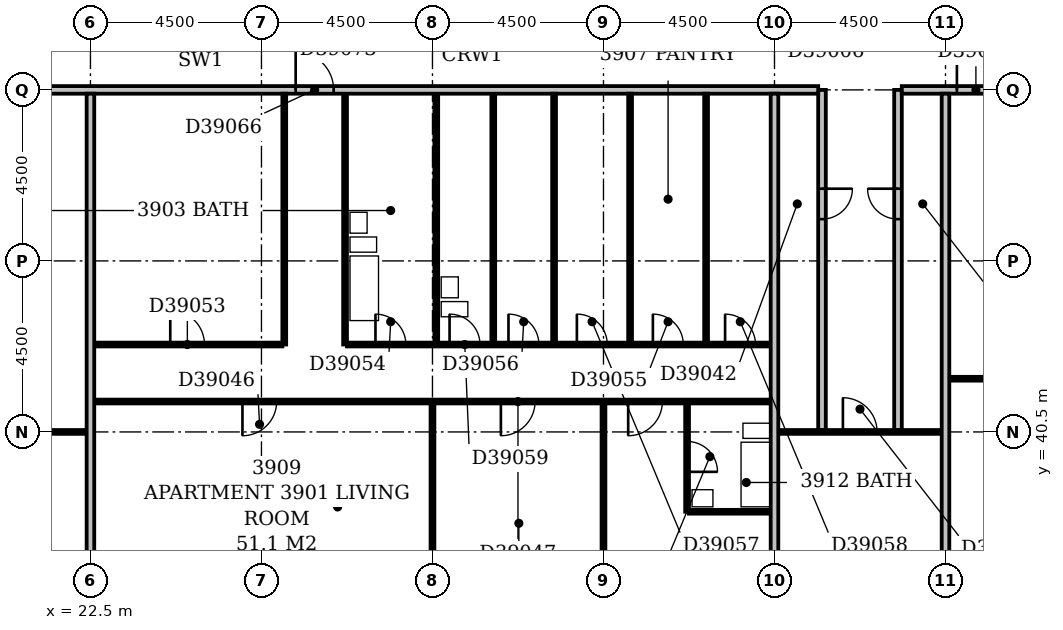
"""IFC4 building model, lengths in metres.
Left out: names, types, materials, properties, quantities, classifications, styles, units other than length and angle.
Written with IfcOpenShell. Run it as: python <this file> out.ifc"""

import sys

from ifc_helpers import new_model, si_unit, direction, frame, frame_2d, origin, place, context, subcontext, project, spatial, rectangle, extrude, element, fill, save


model = new_model("IFC4")
c1 = context("Model", 3, precision=1e-05, world=origin(), true_north=direction((0.0, 1.0)))
c2 = subcontext(c1, "Body", "Model", "MODEL_VIEW")
j1 = project(units=[si_unit("LENGTHUNIT", "METRE"), si_unit("PLANEANGLEUNIT", "RADIAN")], contexts=[c1])
p1 = place(None, origin())
s1 = spatial("IfcSite", under=j1, at=p1, CompositionType="ELEMENT")
p2 = place(p1, origin())
s2 = spatial("IfcBuilding", under=s1, at=p2, CompositionType="ELEMENT")
p3 = place(p2, frame((0.0, 0.0, 155.6)))
s3 = spatial("IfcBuildingStorey", under=s2, at=p3, CompositionType="ELEMENT", Elevation=155.6)
p4 = place(p3, frame((22.5, 36.5, 0.0), z_axis=(0.0, 0.0, 1.0), x_axis=(0.0, 1.0, 0.0)))
e1 = element("IfcWall", 1, at=p4, inside=s3, PredefinedType="PARTITIONING", context=c2, shape_type="SweptSolid", body=[
    extrude(rectangle(XDim=12.9, YDim=0.2, at=frame_2d((6.45, 0.0))), origin(), (0.0, 0.0, 1.0), 3.3),
])
p5 = place(p3, frame((31.5, 36.5, 0.0), z_axis=(0.0, 0.0, 1.0), x_axis=(0.0, 1.0, 0.0)))
e2 = element("IfcWall", 2, at=p5, inside=s3, PredefinedType="PARTITIONING", context=c2, shape_type="SweptSolid", body=[
    extrude(rectangle(XDim=4.75, YDim=0.1, at=frame_2d((2.375, 0.0))), origin(), (0.0, 0.0, 1.0), 3.3),
])
p6 = place(p3, frame((36.0, 36.5, 0.0), z_axis=(0.0, 0.0, 1.0), x_axis=(0.0, 1.0, 0.0)))
e3 = element("IfcWall", 3, at=p6, inside=s3, PredefinedType="PARTITIONING", context=c2, shape_type="SweptSolid", body=[
    extrude(rectangle(XDim=4.75, YDim=0.1, at=frame_2d((2.375, 0.0))), origin(), (0.0, 0.0, 1.0), 2.4),
])
p7 = place(p3, frame((40.5, 36.5, 0.0), z_axis=(0.0, 0.0, 1.0), x_axis=(0.0, 1.0, 0.0)))
e4 = element("IfcWall", 4, at=p7, inside=s3, PredefinedType="PARTITIONING", context=c2, shape_type="SweptSolid", body=[
    extrude(rectangle(XDim=12.9, YDim=0.2, at=frame_2d((6.45, 0.0))), origin(), (0.0, 0.0, 1.0), 3.3),
])
p8 = place(p3, frame((45.0, 36.5, 0.0), z_axis=(0.0, 0.0, 1.0), x_axis=(0.0, 1.0, 0.0)))
e5 = element("IfcWall", 5, at=p8, inside=s3, PredefinedType="PARTITIONING", context=c2, shape_type="SweptSolid", body=[
    extrude(rectangle(XDim=12.9, YDim=0.2, at=frame_2d((6.45, 0.0))), origin(), (0.0, 0.0, 1.0), 2.6),
])
p9 = place(p3, frame((38.2, 38.4, 0.0), z_axis=(0.0, 0.0, 1.0), x_axis=(0.0, 1.0, 0.0)))
e6 = element("IfcWall", 6, at=p9, inside=s3, PredefinedType="PLUMBINGWALL", context=c2, shape_type="SweptSolid", body=[
    extrude(rectangle(XDim=2.85, YDim=0.1, at=frame_2d((1.425, 0.0))), origin(), (0.0, 0.0, 1.0), 3.3),
])
p10 = place(p9, frame((1.05, 0.0, 0.0)))
e7 = element("IfcOpeningElement", 7, at=p10, cuts=e6, PredefinedType="OPENING", context=c2, shape_type="SweptSolid", body=[
    extrude(rectangle(XDim=0.8, YDim=2.1, at=frame_2d((0.4, 1.05))), frame((0.0, 0.062, 0.0), z_axis=(0.0, -1.0, 0.0), x_axis=(1.0, 0.0, 0.0)), (0.0, 0.0, 1.0), 0.124),
])
p11 = place(p3, frame((38.25, 38.4, 0.0), z_axis=(0.0, 0.0, 1.0), x_axis=(1.0, 0.0, 0.0)))
e8 = element("IfcWall", 8, at=p11, inside=s3, PredefinedType="PLUMBINGWALL", context=c2, shape_type="SweptSolid", body=[
    extrude(rectangle(XDim=2.15, YDim=0.1, at=frame_2d((1.075, 0.0))), origin(), (0.0, 0.0, 1.0), 3.3),
])
p12 = place(p3, frame((9.1, 40.5, 0.0), z_axis=(0.0, 0.0, 1.0), x_axis=(1.0, 0.0, 0.0)))
e9 = element("IfcWall", 9, at=p12, inside=s3, PredefinedType="PARTITIONING", context=c2, shape_type="SweptSolid", body=[
    extrude(rectangle(XDim=13.3, YDim=0.1, at=frame_2d((6.65, 0.0))), origin(), (0.0, 0.0, 1.0), 3.3),
])
p13 = place(p3, frame((40.6, 40.5, 0.0), z_axis=(0.0, 0.0, 1.0), x_axis=(1.0, 0.0, 0.0)))
e10 = element("IfcWall", 10, at=p13, inside=s3, PredefinedType="PARTITIONING", context=c2, shape_type="SweptSolid", body=[
    extrude(rectangle(XDim=4.3, YDim=0.1, at=frame_2d((2.15, 0.0))), origin(), (0.0, 0.0, 1.0), 3.3),
])
p14 = place(p13, frame((1.7, 0.0, 0.0)))
e11 = element("IfcOpeningElement", 11, at=p14, cuts=e10, PredefinedType="OPENING", context=c2, shape_type="SweptSolid", body=[
    extrude(rectangle(XDim=0.9, YDim=2.1, at=frame_2d((0.45, 1.05))), frame((0.0, 0.062, 0.0), z_axis=(0.0, -1.0, 0.0), x_axis=(1.0, 0.0, 0.0)), (0.0, 0.0, 1.0), 0.124),
])
p15 = place(p3, frame((41.75, 40.55, 0.0), z_axis=(0.0, 0.0, 1.0), x_axis=(0.0, 1.0, 0.0)))
e12 = element("IfcWall", 12, at=p15, inside=s3, PredefinedType="PARTITIONING", context=c2, shape_type="SweptSolid", body=[
    extrude(rectangle(XDim=8.95, YDim=0.2, at=frame_2d((4.475, 0.0))), origin(), (0.0, 0.0, 1.0), 3.3),
])
p16 = place(p15, frame((5.55, 0.0, 0.0)))
e13 = element("IfcOpeningElement", 13, at=p16, cuts=e12, PredefinedType="OPENING", context=c2, shape_type="SweptSolid", body=[
    extrude(rectangle(XDim=0.8, YDim=2.1, at=frame_2d((0.4, 1.05))), frame((0.0, 0.112, 0.0), z_axis=(0.0, -1.0, 0.0), x_axis=(1.0, 0.0, 0.0)), (0.0, 0.0, 1.0), 0.224),
])
p17 = place(p3, frame((43.75, 40.55, 0.0), z_axis=(0.0, 0.0, 1.0), x_axis=(0.0, 1.0, 0.0)))
e14 = element("IfcWall", 14, at=p17, inside=s3, PredefinedType="PARTITIONING", context=c2, shape_type="SweptSolid", body=[
    extrude(rectangle(XDim=8.95, YDim=0.2, at=frame_2d((4.475, 0.0))), origin(), (0.0, 0.0, 1.0), 3.3),
])
p18 = place(p17, frame((5.55, 0.0, 0.0)))
e15 = element("IfcOpeningElement", 15, at=p18, cuts=e14, PredefinedType="OPENING", context=c2, shape_type="SweptSolid", body=[
    extrude(rectangle(XDim=0.8, YDim=2.1, at=frame_2d((0.4, 1.05))), frame((0.0, 0.112, 0.0), z_axis=(0.0, -1.0, 0.0), x_axis=(1.0, 0.0, 0.0)), (0.0, 0.0, 1.0), 0.224),
])
p19 = place(p3, frame((22.6, 41.3, 0.0), z_axis=(0.0, 0.0, 1.0), x_axis=(1.0, 0.0, 0.0)))
e16 = element("IfcWall", 16, at=p19, inside=s3, PredefinedType="PARTITIONING", context=c2, shape_type="SweptSolid", body=[
    extrude(rectangle(XDim=17.8, YDim=0.1, at=frame_2d((8.9, 0.0))), origin(), (0.0, 0.0, 1.0), 3.3),
])
p20 = place(p19, frame((3.9, 0.0, 0.0)))
e17 = element("IfcOpeningElement", 17, at=p20, cuts=e16, PredefinedType="OPENING", context=c2, shape_type="SweptSolid", body=[
    extrude(rectangle(XDim=0.9, YDim=2.1, at=frame_2d((0.45, 1.05))), frame((0.0, 0.062, 0.0), z_axis=(0.0, -1.0, 0.0), x_axis=(1.0, 0.0, 0.0)), (0.0, 0.0, 1.0), 0.124),
])
p21 = place(p19, frame((10.7, 0.0, 0.0)))
e18 = element("IfcOpeningElement", 18, at=p21, cuts=e16, PredefinedType="OPENING", context=c2, shape_type="SweptSolid", body=[
    extrude(rectangle(XDim=0.9, YDim=2.1, at=frame_2d((0.45, 1.05))), frame((0.0, 0.062, 0.0), z_axis=(0.0, -1.0, 0.0), x_axis=(1.0, 0.0, 0.0)), (0.0, 0.0, 1.0), 0.124),
])
p22 = place(p19, frame((14.05, 0.0, 0.0)))
e19 = element("IfcOpeningElement", 19, at=p22, cuts=e16, PredefinedType="OPENING", context=c2, shape_type="SweptSolid", body=[
    extrude(rectangle(XDim=0.9, YDim=2.1, at=frame_2d((0.45, 1.05))), frame((0.0, 0.062, 0.0), z_axis=(0.0, -1.0, 0.0), x_axis=(1.0, 0.0, 0.0)), (0.0, 0.0, 1.0), 0.124),
])
p23 = place(p3, frame((45.1, 41.9, 0.0), z_axis=(0.0, 0.0, 1.0), x_axis=(1.0, 0.0, 0.0)))
e20 = element("IfcWall", 20, at=p23, inside=s3, PredefinedType="PARTITIONING", context=c2, shape_type="SweptSolid", body=[
    extrude(rectangle(XDim=13.3, YDim=0.1, at=frame_2d((6.65, 0.0))), origin(), (0.0, 0.0, 1.0), 3.3),
])
p24 = place(p23, frame((1.7, 0.0, 0.0)))
e21 = element("IfcOpeningElement", 21, at=p24, cuts=e20, PredefinedType="OPENING", context=c2, shape_type="SweptSolid", body=[
    extrude(rectangle(XDim=0.9, YDim=2.1, at=frame_2d((0.45, 1.05))), frame((0.0, 0.062, 0.0), z_axis=(0.0, -1.0, 0.0), x_axis=(1.0, 0.0, 0.0)), (0.0, 0.0, 1.0), 0.124),
])
p25 = place(p23, frame((6.2, 0.0, 0.0)))
e22 = element("IfcOpeningElement", 22, at=p25, cuts=e20, PredefinedType="OPENING", context=c2, shape_type="SweptSolid", body=[
    extrude(rectangle(XDim=0.9, YDim=2.1, at=frame_2d((0.45, 1.05))), frame((0.0, 0.062, 0.0), z_axis=(0.0, -1.0, 0.0), x_axis=(1.0, 0.0, 0.0)), (0.0, 0.0, 1.0), 0.124),
])
p26 = place(p23, frame((10.7, 0.0, 0.0)))
e23 = element("IfcOpeningElement", 23, at=p26, cuts=e20, PredefinedType="OPENING", context=c2, shape_type="SweptSolid", body=[
    extrude(rectangle(XDim=0.9, YDim=2.1, at=frame_2d((0.45, 1.05))), frame((0.0, 0.062, 0.0), z_axis=(0.0, -1.0, 0.0), x_axis=(1.0, 0.0, 0.0)), (0.0, 0.0, 1.0), 0.124),
])
p27 = place(p3, frame((22.6, 42.8, 0.0), z_axis=(0.0, 0.0, 1.0), x_axis=(1.0, 0.0, 0.0)))
e24 = element("IfcWall", 24, at=p27, inside=s3, PredefinedType="PARTITIONING", context=c2, shape_type="SweptSolid", body=[
    extrude(rectangle(XDim=4.95, YDim=0.1, at=frame_2d((2.475, 0.0))), origin(), (0.0, 0.0, 1.0), 3.3),
])
p28 = place(p27, frame((2.0, 0.0, 0.0)))
e25 = element("IfcOpeningElement", 25, at=p28, cuts=e24, PredefinedType="OPENING", context=c2, shape_type="SweptSolid", body=[
    extrude(rectangle(XDim=0.9, YDim=2.1, at=frame_2d((0.45, 1.05))), frame((0.0, 0.062, 0.0), z_axis=(0.0, -1.0, 0.0), x_axis=(1.0, 0.0, 0.0)), (0.0, 0.0, 1.0), 0.124),
])
p29 = place(p3, frame((27.6, 42.8, 0.0), z_axis=(0.0, 0.0, 1.0), x_axis=(0.0, 1.0, 0.0)))
e26 = element("IfcWall", 26, at=p29, inside=s3, PredefinedType="PARTITIONING", context=c2, shape_type="SweptSolid", body=[
    extrude(rectangle(XDim=6.6, YDim=0.1, at=frame_2d((3.3, 0.0))), origin(), (0.0, 0.0, 1.0), 2.6),
])
p30 = place(p3, frame((29.2, 42.8, 0.0), z_axis=(0.0, 0.0, 1.0), x_axis=(0.0, 1.0, 0.0)))
e27 = element("IfcWall", 27, at=p30, inside=s3, PredefinedType="PLUMBINGWALL", context=c2, shape_type="SweptSolid", body=[
    extrude(rectangle(XDim=6.6, YDim=0.1, at=frame_2d((3.3, 0.0))), origin(), (0.0, 0.0, 1.0), 3.3),
])
p31 = place(p3, frame((29.25, 42.8, 0.0), z_axis=(0.0, 0.0, 1.0), x_axis=(1.0, 0.0, 0.0)))
e28 = element("IfcWall", 28, at=p31, inside=s3, PredefinedType="PARTITIONING", context=c2, shape_type="SweptSolid", body=[
    extrude(rectangle(XDim=11.15, YDim=0.1, at=frame_2d((5.575, 0.0))), origin(), (0.0, 0.0, 1.0), 3.3),
])
p32 = place(p31, frame((0.75, 0.0, 0.0)))
e29 = element("IfcOpeningElement", 29, at=p32, cuts=e28, PredefinedType="OPENING", context=c2, shape_type="SweptSolid", body=[
    extrude(rectangle(XDim=0.8, YDim=2.1, at=frame_2d((0.4, 1.05))), frame((0.0, 0.062, 0.0), z_axis=(0.0, -1.0, 0.0), x_axis=(1.0, 0.0, 0.0)), (0.0, 0.0, 1.0), 0.124),
])
p33 = place(p31, frame((8.05, 0.0, 0.0)))
e30 = element("IfcOpeningElement", 30, at=p33, cuts=e28, PredefinedType="OPENING", context=c2, shape_type="SweptSolid", body=[
    extrude(rectangle(XDim=0.8, YDim=2.1, at=frame_2d((0.4, 1.05))), frame((0.0, 0.062, 0.0), z_axis=(0.0, -1.0, 0.0), x_axis=(1.0, 0.0, 0.0)), (0.0, 0.0, 1.0), 0.124),
])
p34 = place(p31, frame((4.25, 0.0, 0.0)))
e31 = element("IfcOpeningElement", 31, at=p34, cuts=e28, PredefinedType="OPENING", context=c2, shape_type="SweptSolid", body=[
    extrude(rectangle(XDim=0.8, YDim=2.1, at=frame_2d((0.4, 1.05))), frame((0.0, 0.062, 0.0), z_axis=(0.0, -1.0, 0.0), x_axis=(1.0, 0.0, 0.0)), (0.0, 0.0, 1.0), 0.124),
])
p35 = place(p31, frame((6.05, 0.0, 0.0)))
e32 = element("IfcOpeningElement", 32, at=p35, cuts=e28, PredefinedType="OPENING", context=c2, shape_type="SweptSolid", body=[
    extrude(rectangle(XDim=0.8, YDim=2.1, at=frame_2d((0.4, 1.05))), frame((0.0, 0.062, 0.0), z_axis=(0.0, -1.0, 0.0), x_axis=(1.0, 0.0, 0.0)), (0.0, 0.0, 1.0), 0.124),
])
p36 = place(p31, frame((9.95, 0.0, 0.0)))
e33 = element("IfcOpeningElement", 33, at=p36, cuts=e28, PredefinedType="OPENING", context=c2, shape_type="SweptSolid", body=[
    extrude(rectangle(XDim=0.8, YDim=2.1, at=frame_2d((0.4, 1.05))), frame((0.0, 0.062, 0.0), z_axis=(0.0, -1.0, 0.0), x_axis=(1.0, 0.0, 0.0)), (0.0, 0.0, 1.0), 0.124),
])
p37 = place(p31, frame((2.7, 0.0, 0.0)))
e34 = element("IfcOpeningElement", 34, at=p37, cuts=e28, PredefinedType="OPENING", context=c2, shape_type="SweptSolid", body=[
    extrude(rectangle(XDim=0.8, YDim=2.1, at=frame_2d((0.4, 1.05))), frame((0.0, 0.062, 0.0), z_axis=(0.0, -1.0, 0.0), x_axis=(1.0, 0.0, 0.0)), (0.0, 0.0, 1.0), 0.124),
])
for number, where, z_axis, x_axis in (
    (35, (31.6, 42.85, 0.0), (0.0, 0.0, 1.0), (0.0, 1.0, 0.0)),
    (36, (33.1, 42.85, 0.0), (0.0, 0.0, 1.0), (0.0, 1.0, 0.0)),
):
    element("IfcWall", number, at=place(p3, frame(where, z_axis=z_axis, x_axis=x_axis)), inside=s3, PredefinedType="PLUMBINGWALL", context=c2, shape_type="SweptSolid", body=[
        extrude(rectangle(XDim=6.55, YDim=0.1, at=frame_2d((3.275, 0.0))), origin(), (0.0, 0.0, 1.0), 3.3),
    ])
p38 = place(p3, frame((34.7, 42.85, 0.0), z_axis=(0.0, 0.0, 1.0), x_axis=(0.0, 1.0, 0.0)))
e37 = element("IfcWall", 37, at=p38, inside=s3, PredefinedType="PARTITIONING", context=c2, shape_type="SweptSolid", body=[
    extrude(rectangle(XDim=6.55, YDim=0.1, at=frame_2d((3.275, 0.0))), origin(), (0.0, 0.0, 1.0), 3.3),
])
p39 = place(p3, frame((36.7, 42.85, 0.0), z_axis=(0.0, 0.0, 1.0), x_axis=(0.0, 1.0, 0.0)))
e38 = element("IfcWall", 38, at=p39, inside=s3, PredefinedType="PARTITIONING", context=c2, shape_type="SweptSolid", body=[
    extrude(rectangle(XDim=6.55, YDim=0.1, at=frame_2d((3.275, 0.0))), origin(), (0.0, 0.0, 1.0), 2.4),
])
p40 = place(p3, frame((38.7, 42.85, 0.0), z_axis=(0.0, 0.0, 1.0), x_axis=(0.0, 1.0, 0.0)))
e39 = element("IfcWall", 39, at=p40, inside=s3, PredefinedType="PARTITIONING", context=c2, shape_type="SweptSolid", body=[
    extrude(rectangle(XDim=6.55, YDim=0.1, at=frame_2d((3.275, 0.0))), origin(), (0.0, 0.0, 1.0), 3.3),
])
p41 = place(p3, frame((9.1, 49.5, 0.0), z_axis=(0.0, 0.0, 1.0), x_axis=(1.0, 0.0, 0.0)))
e40 = element("IfcWall", 40, at=p41, inside=s3, PredefinedType="PARTITIONING", context=c2, shape_type="SweptSolid", body=[
    extrude(rectangle(XDim=32.55, YDim=0.2, at=frame_2d((16.275, 0.0))), origin(), (0.0, 0.0, 1.0), 3.3),
])
p42 = place(p41, frame((18.8, 0.0, 0.0)))
e41 = element("IfcOpeningElement", 41, at=p42, cuts=e40, PredefinedType="OPENING", context=c2, shape_type="SweptSolid", body=[
    extrude(rectangle(XDim=1.0, YDim=2.1, at=frame_2d((0.5, 1.05))), frame((0.0, 0.112, 0.0), z_axis=(0.0, -1.0, 0.0), x_axis=(1.0, 0.0, 0.0)), (0.0, 0.0, 1.0), 0.224),
])
p43 = place(p41, frame((6.15, 0.0, 0.0)))
e42 = element("IfcOpeningElement", 42, at=p43, cuts=e40, PredefinedType="OPENING", context=c2, shape_type="SweptSolid", body=[
    extrude(rectangle(XDim=0.9, YDim=2.1, at=frame_2d((0.45, 1.05))), frame((0.0, 0.112, 0.0), z_axis=(0.0, -1.0, 0.0), x_axis=(1.0, 0.0, 0.0)), (0.0, 0.0, 1.0), 0.224),
])
p44 = place(p3, frame((43.85, 49.5, 0.0), z_axis=(0.0, 0.0, 1.0), x_axis=(1.0, 0.0, 0.0)))
e43 = element("IfcWall", 43, at=p44, inside=s3, PredefinedType="PARTITIONING", context=c2, shape_type="SweptSolid", body=[
    extrude(rectangle(XDim=15.8, YDim=0.2, at=frame_2d((7.9, 0.0))), origin(), (0.0, 0.0, 1.0), 3.3),
])
p45 = place(p44, frame((1.45, 0.0, 0.0)))
e44 = element("IfcOpeningElement", 44, at=p45, cuts=e43, PredefinedType="OPENING", context=c2, shape_type="SweptSolid", body=[
    extrude(rectangle(XDim=1.0, YDim=2.1, at=frame_2d((0.5, 1.05))), frame((0.0, 0.112, 0.0), z_axis=(0.0, -1.0, 0.0), x_axis=(1.0, 0.0, 0.0)), (0.0, 0.0, 1.0), 0.224),
])
p46 = place(p10, frame((0.8, 0.0, 0.0), z_axis=(0.0, 0.0, 1.0), x_axis=(-1.0, 0.0, 0.0)))
e45 = element("IfcDoor", 45, at=p46, inside=s3, OperationType="SINGLE_SWING_RIGHT", PredefinedType="DOOR", context=c2, shape_type="SweptSolid", body=[
    extrude(rectangle(XDim=0.8, YDim=2.1, at=frame_2d((0.4, 1.05))), frame((0.0, 0.025, 0.0), z_axis=(0.0, -1.0, 0.0), x_axis=(1.0, 0.0, 0.0)), (0.0, 0.0, 1.0), 0.05),
])
fill(e7, e45)
p47 = place(p14, origin())
e46 = element("IfcDoor", 46, at=p47, inside=s3, OperationType="SINGLE_SWING_LEFT", PredefinedType="DOOR", context=c2, shape_type="SweptSolid", body=[
    extrude(rectangle(XDim=0.9, YDim=2.1, at=frame_2d((0.45, 1.05))), frame((0.0, 0.025, 0.0), z_axis=(0.0, -1.0, 0.0), x_axis=(1.0, 0.0, 0.0)), (0.0, 0.0, 1.0), 0.05),
])
fill(e11, e46)
p48 = place(p16, origin())
e47 = element("IfcDoor", 47, at=p48, inside=s3, OperationType="SINGLE_SWING_RIGHT", PredefinedType="DOOR", context=c2, shape_type="SweptSolid", body=[
    extrude(rectangle(XDim=0.8, YDim=2.1, at=frame_2d((0.4, 1.05))), frame((0.0, 0.025, 0.0), z_axis=(0.0, -1.0, 0.0), x_axis=(1.0, 0.0, 0.0)), (0.0, 0.0, 1.0), 0.05),
])
fill(e13, e47)
p49 = place(p18, frame((0.8, 0.0, 0.0), z_axis=(0.0, 0.0, 1.0), x_axis=(-1.0, 0.0, 0.0)))
e48 = element("IfcDoor", 48, at=p49, inside=s3, OperationType="SINGLE_SWING_LEFT", PredefinedType="DOOR", context=c2, shape_type="SweptSolid", body=[
    extrude(rectangle(XDim=0.8, YDim=2.1, at=frame_2d((0.4, 1.05))), frame((0.0, 0.025, 0.0), z_axis=(0.0, -1.0, 0.0), x_axis=(1.0, 0.0, 0.0)), (0.0, 0.0, 1.0), 0.05),
])
fill(e15, e48)
p50 = place(p20, frame((0.9, 0.0, 0.0), z_axis=(0.0, 0.0, 1.0), x_axis=(-1.0, 0.0, 0.0)))
e49 = element("IfcDoor", 49, at=p50, inside=s3, OperationType="SINGLE_SWING_RIGHT", PredefinedType="DOOR", context=c2, shape_type="SweptSolid", body=[
    extrude(rectangle(XDim=0.9, YDim=2.1, at=frame_2d((0.45, 1.05))), frame((0.0, 0.025, 0.0), z_axis=(0.0, -1.0, 0.0), x_axis=(1.0, 0.0, 0.0)), (0.0, 0.0, 1.0), 0.05),
])
fill(e17, e49)
p51 = place(p21, frame((0.9, 0.0, 0.0), z_axis=(0.0, 0.0, 1.0), x_axis=(-1.0, 0.0, 0.0)))
e50 = element("IfcDoor", 50, at=p51, inside=s3, OperationType="SINGLE_SWING_RIGHT", PredefinedType="DOOR", context=c2, shape_type="SweptSolid", body=[
    extrude(rectangle(XDim=0.9, YDim=2.1, at=frame_2d((0.45, 1.05))), frame((0.0, 0.025, 0.0), z_axis=(0.0, -1.0, 0.0), x_axis=(1.0, 0.0, 0.0)), (0.0, 0.0, 1.0), 0.05),
])
fill(e18, e50)
p52 = place(p22, frame((0.9, 0.0, 0.0), z_axis=(0.0, 0.0, 1.0), x_axis=(-1.0, 0.0, 0.0)))
e51 = element("IfcDoor", 51, at=p52, inside=s3, OperationType="SINGLE_SWING_RIGHT", PredefinedType="DOOR", context=c2, shape_type="SweptSolid", body=[
    extrude(rectangle(XDim=0.9, YDim=2.1, at=frame_2d((0.45, 1.05))), frame((0.0, 0.025, 0.0), z_axis=(0.0, -1.0, 0.0), x_axis=(1.0, 0.0, 0.0)), (0.0, 0.0, 1.0), 0.05),
])
fill(e19, e51)
p53 = place(p28, origin())
e52 = element("IfcDoor", 52, at=p53, inside=s3, OperationType="SINGLE_SWING_LEFT", PredefinedType="DOOR", context=c2, shape_type="SweptSolid", body=[
    extrude(rectangle(XDim=0.9, YDim=2.1, at=frame_2d((0.45, 1.05))), frame((0.0, 0.025, 0.0), z_axis=(0.0, -1.0, 0.0), x_axis=(1.0, 0.0, 0.0)), (0.0, 0.0, 1.0), 0.05),
])
fill(e25, e52)
p54 = place(p32, origin())
e53 = element("IfcDoor", 53, at=p54, inside=s3, OperationType="SINGLE_SWING_LEFT", PredefinedType="DOOR", context=c2, shape_type="SweptSolid", body=[
    extrude(rectangle(XDim=0.8, YDim=2.1, at=frame_2d((0.4, 1.05))), frame((0.0, 0.025, 0.0), z_axis=(0.0, -1.0, 0.0), x_axis=(1.0, 0.0, 0.0)), (0.0, 0.0, 1.0), 0.05),
])
fill(e29, e53)
p55 = place(p33, origin())
e54 = element("IfcDoor", 54, at=p55, inside=s3, OperationType="SINGLE_SWING_LEFT", PredefinedType="DOOR", context=c2, shape_type="SweptSolid", body=[
    extrude(rectangle(XDim=0.8, YDim=2.1, at=frame_2d((0.4, 1.05))), frame((0.0, 0.025, 0.0), z_axis=(0.0, -1.0, 0.0), x_axis=(1.0, 0.0, 0.0)), (0.0, 0.0, 1.0), 0.05),
])
fill(e30, e54)
p56 = place(p34, origin())
e55 = element("IfcDoor", 55, at=p56, inside=s3, OperationType="SINGLE_SWING_LEFT", PredefinedType="DOOR", context=c2, shape_type="SweptSolid", body=[
    extrude(rectangle(XDim=0.8, YDim=2.1, at=frame_2d((0.4, 1.05))), frame((0.0, 0.025, 0.0), z_axis=(0.0, -1.0, 0.0), x_axis=(1.0, 0.0, 0.0)), (0.0, 0.0, 1.0), 0.05),
])
fill(e31, e55)
p57 = place(p35, origin())
e56 = element("IfcDoor", 56, at=p57, inside=s3, OperationType="SINGLE_SWING_LEFT", PredefinedType="DOOR", context=c2, shape_type="SweptSolid", body=[
    extrude(rectangle(XDim=0.8, YDim=2.1, at=frame_2d((0.4, 1.05))), frame((0.0, 0.025, 0.0), z_axis=(0.0, -1.0, 0.0), x_axis=(1.0, 0.0, 0.0)), (0.0, 0.0, 1.0), 0.05),
])
fill(e32, e56)
p58 = place(p36, origin())
e57 = element("IfcDoor", 57, at=p58, inside=s3, OperationType="SINGLE_SWING_LEFT", PredefinedType="DOOR", context=c2, shape_type="SweptSolid", body=[
    extrude(rectangle(XDim=0.8, YDim=2.1, at=frame_2d((0.4, 1.05))), frame((0.0, 0.025, 0.0), z_axis=(0.0, -1.0, 0.0), x_axis=(1.0, 0.0, 0.0)), (0.0, 0.0, 1.0), 0.05),
])
fill(e33, e57)
p59 = place(p37, origin())
e58 = element("IfcDoor", 58, at=p59, inside=s3, OperationType="SINGLE_SWING_LEFT", PredefinedType="DOOR", context=c2, shape_type="SweptSolid", body=[
    extrude(rectangle(XDim=0.8, YDim=2.1, at=frame_2d((0.4, 1.05))), frame((0.0, 0.025, 0.0), z_axis=(0.0, -1.0, 0.0), x_axis=(1.0, 0.0, 0.0)), (0.0, 0.0, 1.0), 0.05),
])
fill(e34, e58)
p60 = place(p42, origin())
e59 = element("IfcDoor", 59, at=p60, inside=s3, OperationType="SINGLE_SWING_LEFT", PredefinedType="DOOR", context=c2, shape_type="SweptSolid", body=[
    extrude(rectangle(XDim=1.0, YDim=2.1, at=frame_2d((0.5, 1.05))), frame((0.0, 0.025, 0.0), z_axis=(0.0, -1.0, 0.0), x_axis=(1.0, 0.0, 0.0)), (0.0, 0.0, 1.0), 0.05),
])
fill(e41, e59)
p61 = place(p45, origin())
e60 = element("IfcDoor", 60, at=p61, inside=s3, OperationType="SINGLE_SWING_LEFT", PredefinedType="DOOR", context=c2, shape_type="SweptSolid", body=[
    extrude(rectangle(XDim=1.0, YDim=2.1, at=frame_2d((0.5, 1.05))), frame((0.0, 0.025, 0.0), z_axis=(0.0, -1.0, 0.0), x_axis=(1.0, 0.0, 0.0)), (0.0, 0.0, 1.0), 0.05),
])
fill(e44, e60)
save(model, sys.argv[1])
